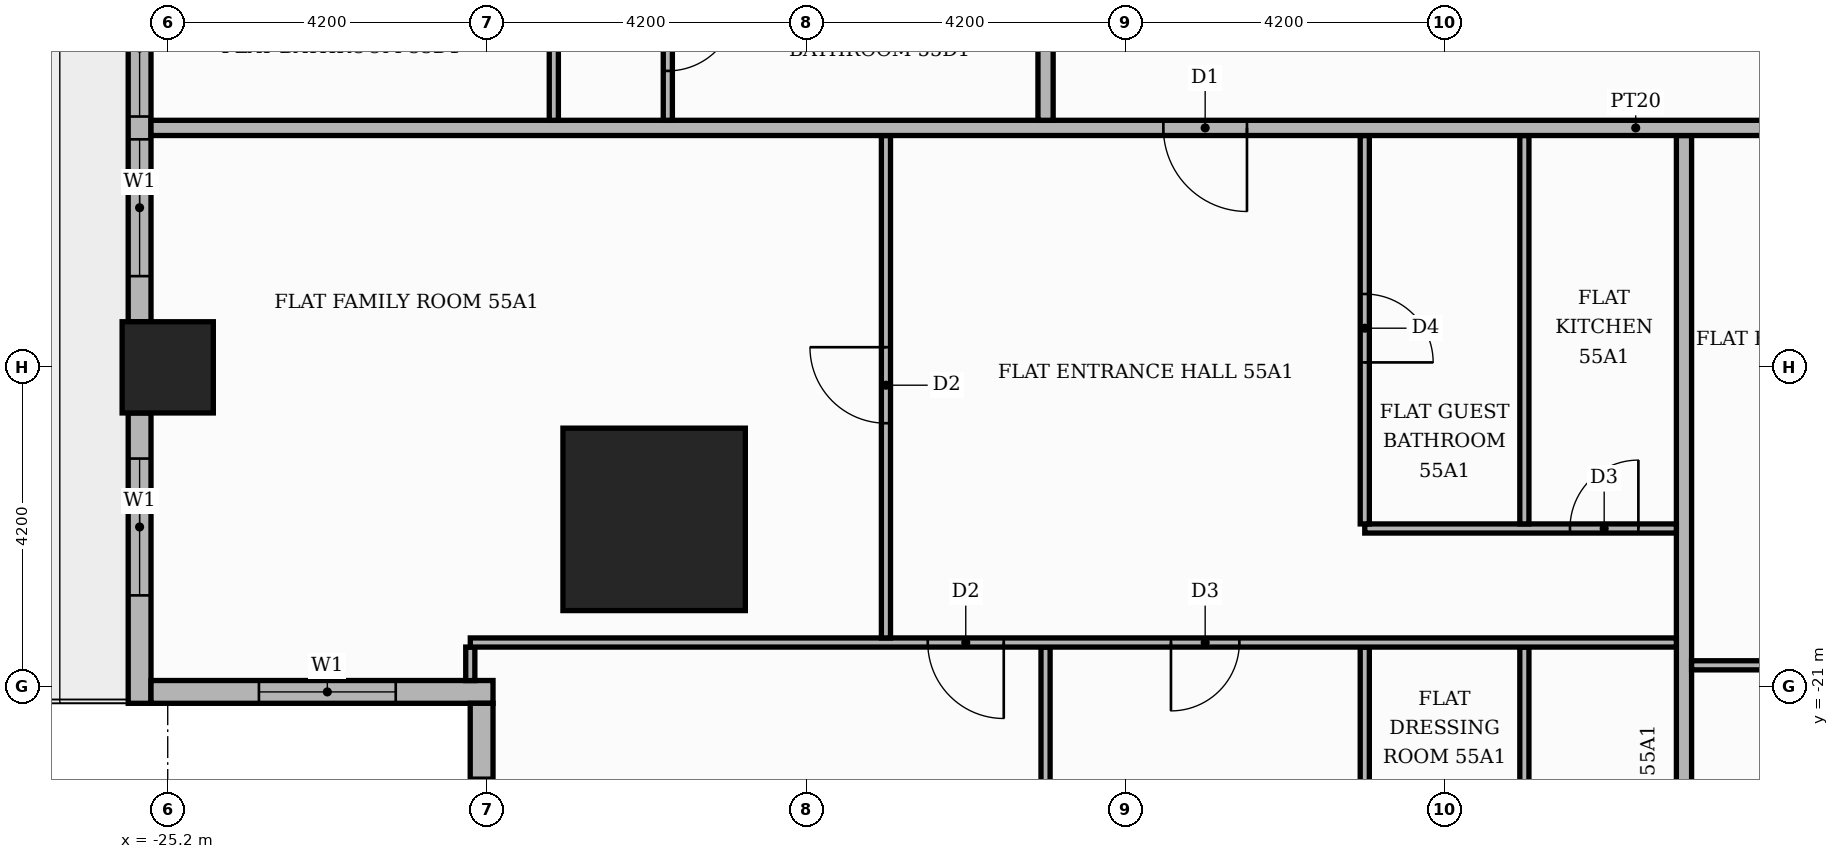
"""IFC4 building model, lengths in metres.
Left out: names, types, materials, properties, quantities, classifications, styles, units other than length and angle.
Written with IfcOpenShell. Run it as: python <this file> out.ifc"""

import sys

from ifc_helpers import new_model, si_unit, direction, frame, frame_2d, origin, origin_2d, place, context, subcontext, project, spatial, rectangle, extrude, element, fill, save


model = new_model("IFC4")
c1 = context("Model", 3, precision=1e-05, world=origin(), true_north=direction((0.0, 1.0)))
c2 = subcontext(c1, "Body", "Model", "MODEL_VIEW")
j1 = project(units=[si_unit("LENGTHUNIT", "METRE"), si_unit("PLANEANGLEUNIT", "RADIAN")], contexts=[c1])
p1 = place(None, origin())
s1 = spatial("IfcSite", under=j1, at=p1, CompositionType="ELEMENT")
p2 = place(p1, origin())
s2 = spatial("IfcBuilding", under=s1, at=p2, CompositionType="ELEMENT")
p3 = place(p2, frame((0.0, 0.0, 231.3)))
s3 = spatial("IfcBuildingStorey", under=s2, at=p3, CompositionType="ELEMENT", Elevation=231.3)
p4 = place(p3, frame((-18.8, -18.8, 0.0), z_axis=(0.0, 0.0, 1.0), x_axis=(1.0, 0.0, 0.0)))
e1 = element("IfcColumn", 1, at=p4, inside=s3, PredefinedType="COLUMN", context=c2, shape_type="SweptSolid", body=[
    extrude(rectangle(XDim=2.4, YDim=2.4, at=origin_2d()), origin(), (0.0, 0.0, 1.0), 3.9),
])
p5 = place(p3, frame((-25.2, -16.8, 0.0), z_axis=(0.0, 0.0, 1.0), x_axis=(1.0, 0.0, 0.0)))
e2 = element("IfcColumn", 2, at=p5, inside=s3, PredefinedType="COLUMN", context=c2, shape_type="SweptSolid", body=[
    extrude(rectangle(XDim=1.2, YDim=1.2, at=origin_2d()), origin(), (0.0, 0.0, 1.0), 3.9),
])
p6 = place(p3, frame((-25.57, -9.0, 0.0), z_axis=(0.0, 0.0, 1.0), x_axis=(0.0, -1.0, 0.0)))
e3 = element("IfcWall", 3, at=p6, inside=s3, PredefinedType="STANDARD", context=c2, shape_type="SweptSolid", body=[
    extrude(rectangle(XDim=7.2, YDim=0.3, at=frame_2d((3.6, 0.0))), origin(), (0.0, 0.0, 1.0), 3.4),
])
p7 = place(p6, frame((0.6, 0.0, 0.9)))
e4 = element("IfcOpeningElement", 4, at=p7, cuts=e3, PredefinedType="OPENING", context=c2, shape_type="SweptSolid", body=[
    extrude(rectangle(XDim=1.8, YDim=2.1, at=frame_2d((0.9, 1.05))), frame((0.0, 0.16, 0.0), z_axis=(0.0, -1.0, 0.0), x_axis=(1.0, 0.0, 0.0)), (0.0, 0.0, 1.0), 0.32),
])
p8 = place(p6, frame((2.7, 0.0, 0.9)))
e5 = element("IfcOpeningElement", 5, at=p8, cuts=e3, PredefinedType="OPENING", context=c2, shape_type="SweptSolid", body=[
    extrude(rectangle(XDim=1.8, YDim=2.1, at=frame_2d((0.9, 1.05))), frame((0.0, 0.16, 0.0), z_axis=(0.0, -1.0, 0.0), x_axis=(1.0, 0.0, 0.0)), (0.0, 0.0, 1.0), 0.32),
])
p9 = place(p6, frame((4.8, 0.0, 0.9)))
e6 = element("IfcOpeningElement", 6, at=p9, cuts=e3, PredefinedType="OPENING", context=c2, shape_type="SweptSolid", body=[
    extrude(rectangle(XDim=1.8, YDim=2.1, at=frame_2d((0.9, 1.05))), frame((0.0, 0.16, 0.0), z_axis=(0.0, -1.0, 0.0), x_axis=(1.0, 0.0, 0.0)), (0.0, 0.0, 1.0), 0.32),
])
p10 = place(p3, frame((-25.57, -17.4, 0.0), z_axis=(0.0, 0.0, 1.0), x_axis=(0.0, -1.0, 0.0)))
e7 = element("IfcWall", 7, at=p10, inside=s3, PredefinedType="STANDARD", context=c2, shape_type="SweptSolid", body=[
    extrude(rectangle(XDim=3.82, YDim=0.3, at=frame_2d((1.91, 0.0))), origin(), (0.0, 0.0, 1.0), 3.4),
])
p11 = place(p10, frame((0.6, 0.0, 0.9)))
e8 = element("IfcOpeningElement", 8, at=p11, cuts=e7, PredefinedType="OPENING", context=c2, shape_type="SweptSolid", body=[
    extrude(rectangle(XDim=1.8, YDim=2.1, at=frame_2d((0.9, 1.05))), frame((0.0, 0.16, 0.0), z_axis=(0.0, -1.0, 0.0), x_axis=(1.0, 0.0, 0.0)), (0.0, 0.0, 1.0), 0.32),
])
p12 = place(p3, frame((-25.42, -21.07, 0.0), z_axis=(0.0, 0.0, 1.0), x_axis=(1.0, 0.0, 0.0)))
e9 = element("IfcWall", 9, at=p12, inside=s3, PredefinedType="STANDARD", context=c2, shape_type="SweptSolid", body=[
    extrude(rectangle(XDim=4.5, YDim=0.3, at=frame_2d((2.25, 0.0))), origin(), (0.0, 0.0, 1.0), 3.4),
])
p13 = place(p12, frame((1.42, 0.0, 0.9)))
e10 = element("IfcOpeningElement", 10, at=p13, cuts=e9, PredefinedType="OPENING", context=c2, shape_type="SweptSolid", body=[
    extrude(rectangle(XDim=1.8, YDim=2.1, at=frame_2d((0.9, 1.05))), frame((0.0, 0.16, 0.0), z_axis=(0.0, -1.0, 0.0), x_axis=(1.0, 0.0, 0.0)), (0.0, 0.0, 1.0), 0.32),
])
p14 = place(p3, frame((-21.07, -21.22, 0.0), z_axis=(0.0, 0.0, 1.0), x_axis=(0.0, -1.0, 0.0)))
e11 = element("IfcWall", 11, at=p14, inside=s3, PredefinedType="STANDARD", context=c2, shape_type="SweptSolid", body=[
    extrude(rectangle(XDim=4.5, YDim=0.3, at=frame_2d((2.25, 0.0))), origin(), (0.0, 0.0, 1.0), 3.4),
])
p15 = place(p14, frame((0.98, 0.0, 0.9)))
e12 = element("IfcOpeningElement", 12, at=p15, cuts=e11, PredefinedType="OPENING", context=c2, shape_type="SweptSolid", body=[
    extrude(rectangle(XDim=1.8, YDim=2.1, at=frame_2d((0.9, 1.05))), frame((0.0, 0.16, 0.0), z_axis=(0.0, -1.0, 0.0), x_axis=(1.0, 0.0, 0.0)), (0.0, 0.0, 1.0), 0.32),
])
p16 = place(p3, frame((-13.65, -25.42, 0.0), z_axis=(0.0, 0.0, 1.0), x_axis=(0.0, 1.0, 0.0)))
e13 = element("IfcWall", 13, at=p16, inside=s3, PredefinedType="PARTITIONING", context=c2, shape_type="SweptSolid", body=[
    extrude(rectangle(XDim=4.94, YDim=0.12, at=frame_2d((2.47, 0.0))), origin(), (0.0, 0.0, 1.0), 3.4),
])
p17 = place(p3, frame((-9.45, -25.42, 0.0), z_axis=(0.0, 0.0, 1.0), x_axis=(0.0, 1.0, 0.0)))
e14 = element("IfcWall", 14, at=p17, inside=s3, PredefinedType="PARTITIONING", context=c2, shape_type="SweptSolid", body=[
    extrude(rectangle(XDim=4.94, YDim=0.12, at=frame_2d((2.47, 0.0))), origin(), (0.0, 0.0, 1.0), 3.4),
])
p18 = place(p17, frame((1.9, 0.0, 0.0)))
e15 = element("IfcOpeningElement", 15, at=p18, cuts=e14, PredefinedType="OPENING", context=c2, shape_type="SweptSolid", body=[
    extrude(rectangle(XDim=0.9, YDim=2.1, at=frame_2d((0.45, 1.05))), frame((0.0, 0.07, 0.0), z_axis=(0.0, -1.0, 0.0), x_axis=(1.0, 0.0, 0.0)), (0.0, 0.0, 1.0), 0.14),
])
p19 = place(p3, frame((-7.35, -25.42, 0.0), z_axis=(0.0, 0.0, 1.0), x_axis=(0.0, 1.0, 0.0)))
e16 = element("IfcWall", 16, at=p19, inside=s3, PredefinedType="PARTITIONING", context=c2, shape_type="SweptSolid", body=[
    extrude(rectangle(XDim=4.94, YDim=0.12, at=frame_2d((2.47, 0.0))), origin(), (0.0, 0.0, 1.0), 3.4),
])
p20 = place(p19, frame((1.9, 0.0, 0.0)))
e17 = element("IfcOpeningElement", 17, at=p20, cuts=e16, PredefinedType="OPENING", context=c2, shape_type="SweptSolid", body=[
    extrude(rectangle(XDim=0.9, YDim=2.1, at=frame_2d((0.45, 1.05))), frame((0.0, 0.07, 0.0), z_axis=(0.0, -1.0, 0.0), x_axis=(1.0, 0.0, 0.0)), (0.0, 0.0, 1.0), 0.14),
])
p21 = place(p3, frame((-5.25, -25.42, 0.0), z_axis=(0.0, 0.0, 1.0), x_axis=(0.0, 1.0, 0.0)))
e18 = element("IfcWall", 18, at=p21, inside=s3, PredefinedType="PARTITIONING", context=c2, shape_type="SweptSolid", body=[
    extrude(rectangle(XDim=11.67, YDim=0.2, at=frame_2d((5.835, 0.0))), origin(), (0.0, 0.0, 1.0), 3.4),
])
p22 = place(p3, frame((-21.219, -20.921, 0.0), z_axis=(0.0, 0.0, 1.0), x_axis=(0.0, 1.0, 0.0)))
e19 = element("IfcWall", 19, at=p22, inside=s3, PredefinedType="PARTITIONING", context=c2, shape_type="SweptSolid", body=[
    extrude(rectangle(XDim=0.441, YDim=0.12, at=frame_2d((0.22, 0.0))), origin(), (0.0, 0.0, 1.0), 3.4),
])
p23 = place(p3, frame((-5.15, -20.72, 0.0), z_axis=(0.0, 0.0, 1.0), x_axis=(1.0, 0.0, 0.0)))
e20 = element("IfcWall", 20, at=p23, inside=s3, PredefinedType="PARTITIONING", context=c2, shape_type="SweptSolid", body=[
    extrude(rectangle(XDim=18.7, YDim=0.12, at=frame_2d((9.35, 0.0))), origin(), (0.0, 0.0, 1.0), 3.4),
])
p24 = place(p23, frame((3.65, 0.0, 0.0)))
e21 = element("IfcOpeningElement", 21, at=p24, cuts=e20, PredefinedType="OPENING", context=c2, shape_type="SweptSolid", body=[
    extrude(rectangle(XDim=0.9, YDim=2.1, at=frame_2d((0.45, 1.05))), frame((0.0, 0.07, 0.0), z_axis=(0.0, -1.0, 0.0), x_axis=(1.0, 0.0, 0.0)), (0.0, 0.0, 1.0), 0.14),
])
p25 = place(p23, frame((15.15, 0.0, 0.0)))
e22 = element("IfcOpeningElement", 22, at=p25, cuts=e20, PredefinedType="OPENING", context=c2, shape_type="SweptSolid", body=[
    extrude(rectangle(XDim=1.0, YDim=2.1, at=frame_2d((0.5, 1.05))), frame((0.0, 0.07, 0.0), z_axis=(0.0, -1.0, 0.0), x_axis=(1.0, 0.0, 0.0)), (0.0, 0.0, 1.0), 0.14),
])
p26 = place(p3, frame((-21.219, -20.42, 0.0), z_axis=(0.0, 0.0, 1.0), x_axis=(1.0, 0.0, 0.0)))
e23 = element("IfcWall", 23, at=p26, inside=s3, PredefinedType="PARTITIONING", context=c2, shape_type="SweptSolid", body=[
    extrude(rectangle(XDim=15.869, YDim=0.12, at=frame_2d((7.935, 0.0))), origin(), (0.0, 0.0, 1.0), 3.4),
])
p27 = place(p26, frame((6.019, 0.0, 0.0)))
e24 = element("IfcOpeningElement", 24, at=p27, cuts=e23, PredefinedType="OPENING", context=c2, shape_type="SweptSolid", body=[
    extrude(rectangle(XDim=1.0, YDim=2.1, at=frame_2d((0.5, 1.05))), frame((0.0, 0.07, 0.0), z_axis=(0.0, -1.0, 0.0), x_axis=(1.0, 0.0, 0.0)), (0.0, 0.0, 1.0), 0.14),
])
p28 = place(p26, frame((9.219, 0.0, 0.0)))
e25 = element("IfcOpeningElement", 25, at=p28, cuts=e23, PredefinedType="OPENING", context=c2, shape_type="SweptSolid", body=[
    extrude(rectangle(XDim=0.9, YDim=2.1, at=frame_2d((0.45, 1.05))), frame((0.0, 0.07, 0.0), z_axis=(0.0, -1.0, 0.0), x_axis=(1.0, 0.0, 0.0)), (0.0, 0.0, 1.0), 0.14),
])
p29 = place(p3, frame((-15.75, -20.36, 0.0), z_axis=(0.0, 0.0, 1.0), x_axis=(0.0, 1.0, 0.0)))
e26 = element("IfcWall", 26, at=p29, inside=s3, PredefinedType="PARTITIONING", context=c2, shape_type="SweptSolid", body=[
    extrude(rectangle(XDim=6.61, YDim=0.12, at=frame_2d((3.305, 0.0))), origin(), (0.0, 0.0, 1.0), 3.4),
])
p30 = place(p29, frame((2.825, 0.0, 0.0)))
e27 = element("IfcOpeningElement", 27, at=p30, cuts=e26, PredefinedType="OPENING", context=c2, shape_type="SweptSolid", body=[
    extrude(rectangle(XDim=1.0, YDim=2.1, at=frame_2d((0.5, 1.05))), frame((0.0, 0.07, 0.0), z_axis=(0.0, -1.0, 0.0), x_axis=(1.0, 0.0, 0.0)), (0.0, 0.0, 1.0), 0.14),
])
p31 = place(p3, frame((-9.45, -18.92, 0.0), z_axis=(0.0, 0.0, 1.0), x_axis=(1.0, 0.0, 0.0)))
e28 = element("IfcWall", 28, at=p31, inside=s3, PredefinedType="PARTITIONING", context=c2, shape_type="SweptSolid", body=[
    extrude(rectangle(XDim=4.1, YDim=0.12, at=frame_2d((2.05, 0.0))), origin(), (0.0, 0.0, 1.0), 3.4),
])
p32 = place(p31, frame((2.7, 0.0, 0.0)))
e29 = element("IfcOpeningElement", 29, at=p32, cuts=e28, PredefinedType="OPENING", context=c2, shape_type="SweptSolid", body=[
    extrude(rectangle(XDim=0.9, YDim=2.1, at=frame_2d((0.45, 1.05))), frame((0.0, 0.07, 0.0), z_axis=(0.0, -1.0, 0.0), x_axis=(1.0, 0.0, 0.0)), (0.0, 0.0, 1.0), 0.14),
])
p33 = place(p3, frame((-9.45, -18.86, 0.0), z_axis=(0.0, 0.0, 1.0), x_axis=(0.0, 1.0, 0.0)))
e30 = element("IfcWall", 30, at=p33, inside=s3, PredefinedType="PARTITIONING", context=c2, shape_type="SweptSolid", body=[
    extrude(rectangle(XDim=5.11, YDim=0.12, at=frame_2d((2.555, 0.0))), origin(), (0.0, 0.0, 1.0), 3.4),
])
p34 = place(p33, frame((2.125, 0.0, 0.0)))
e31 = element("IfcOpeningElement", 31, at=p34, cuts=e30, PredefinedType="OPENING", context=c2, shape_type="SweptSolid", body=[
    extrude(rectangle(XDim=0.9, YDim=2.1, at=frame_2d((0.45, 1.05))), frame((0.0, 0.07, 0.0), z_axis=(0.0, -1.0, 0.0), x_axis=(1.0, 0.0, 0.0)), (0.0, 0.0, 1.0), 0.14),
])
p35 = place(p3, frame((-7.35, -18.86, 0.0), z_axis=(0.0, 0.0, 1.0), x_axis=(0.0, 1.0, 0.0)))
e32 = element("IfcWall", 32, at=p35, inside=s3, PredefinedType="PARTITIONING", context=c2, shape_type="SweptSolid", body=[
    extrude(rectangle(XDim=5.11, YDim=0.12, at=frame_2d((2.555, 0.0))), origin(), (0.0, 0.0, 1.0), 3.4),
])
p36 = place(p3, frame((-25.42, -13.65, 0.0), z_axis=(0.0, 0.0, 1.0), x_axis=(1.0, 0.0, 0.0)))
e33 = element("IfcWall", 33, at=p36, inside=s3, PredefinedType="PARTITIONING", context=c2, shape_type="SweptSolid", body=[
    extrude(rectangle(XDim=39.07, YDim=0.2, at=frame_2d((19.535, 0.0))), origin(), (0.0, 0.0, 1.0), 3.4),
])
p37 = place(p36, frame((13.32, 0.0, 0.0)))
e34 = element("IfcOpeningElement", 34, at=p37, cuts=e33, PredefinedType="OPENING", context=c2, shape_type="SweptSolid", body=[
    extrude(rectangle(XDim=1.1, YDim=2.4, at=frame_2d((0.55, 1.2))), frame((0.0, 0.11, 0.0), z_axis=(0.0, -1.0, 0.0), x_axis=(1.0, 0.0, 0.0)), (0.0, 0.0, 1.0), 0.22),
])
p38 = place(p36, frame((21.72, 0.0, 0.0)))
e35 = element("IfcOpeningElement", 35, at=p38, cuts=e33, PredefinedType="OPENING", context=c2, shape_type="SweptSolid", body=[
    extrude(rectangle(XDim=1.1, YDim=2.4, at=frame_2d((0.55, 1.2))), frame((0.0, 0.11, 0.0), z_axis=(0.0, -1.0, 0.0), x_axis=(1.0, 0.0, 0.0)), (0.0, 0.0, 1.0), 0.22),
])
p39 = place(p3, frame((-20.12, -13.55, 0.0), z_axis=(0.0, 0.0, 1.0), x_axis=(0.0, 1.0, 0.0)))
e36 = element("IfcWall", 36, at=p39, inside=s3, PredefinedType="PARTITIONING", context=c2, shape_type="SweptSolid", body=[
    extrude(rectangle(XDim=1.94, YDim=0.12, at=frame_2d((0.97, 0.0))), origin(), (0.0, 0.0, 1.0), 3.4),
])
p40 = place(p3, frame((-18.62, -13.55, 0.0), z_axis=(0.0, 0.0, 1.0), x_axis=(0.0, 1.0, 0.0)))
e37 = element("IfcWall", 37, at=p40, inside=s3, PredefinedType="PARTITIONING", context=c2, shape_type="SweptSolid", body=[
    extrude(rectangle(XDim=2.24, YDim=0.12, at=frame_2d((1.12, 0.0))), origin(), (0.0, 0.0, 1.0), 3.4),
])
p41 = place(p40, frame((0.65, 0.0, 0.0)))
e38 = element("IfcOpeningElement", 38, at=p41, cuts=e37, PredefinedType="OPENING", context=c2, shape_type="SweptSolid", body=[
    extrude(rectangle(XDim=0.9, YDim=2.1, at=frame_2d((0.45, 1.05))), frame((0.0, 0.07, 0.0), z_axis=(0.0, -1.0, 0.0), x_axis=(1.0, 0.0, 0.0)), (0.0, 0.0, 1.0), 0.14),
])
p42 = place(p3, frame((-13.65, -13.55, 0.0), z_axis=(0.0, 0.0, 1.0), x_axis=(0.0, 1.0, 0.0)))
e39 = element("IfcWall", 39, at=p42, inside=s3, PredefinedType="PARTITIONING", context=c2, shape_type="SweptSolid", body=[
    extrude(rectangle(XDim=27.1, YDim=0.2, at=frame_2d((13.55, 0.0))), origin(), (0.0, 0.0, 1.0), 3.4),
])
p43 = place(p42, frame((23.5, 0.0, 0.0)))
e40 = element("IfcOpeningElement", 40, at=p43, cuts=e39, PredefinedType="OPENING", context=c2, shape_type="SweptSolid", body=[
    extrude(rectangle(XDim=1.1, YDim=2.4, at=frame_2d((0.55, 1.2))), frame((0.0, 0.11, 0.0), z_axis=(0.0, -1.0, 0.0), x_axis=(1.0, 0.0, 0.0)), (0.0, 0.0, 1.0), 0.22),
])
p44 = place(p8, origin())
e41 = element("IfcWindow", 41, at=p44, inside=s3, PartitioningType="SINGLE_PANEL", PredefinedType="WINDOW", context=c2, shape_type="SweptSolid", body=[
    extrude(rectangle(XDim=1.8, YDim=2.1, at=frame_2d((0.9, 1.05))), frame((0.0, 0.03, 0.0), z_axis=(0.0, -1.0, 0.0), x_axis=(1.0, 0.0, 0.0)), (0.0, 0.0, 1.0), 0.06),
])
fill(e5, e41)
p45 = place(p9, origin())
e42 = element("IfcWindow", 42, at=p45, inside=s3, PartitioningType="SINGLE_PANEL", PredefinedType="WINDOW", context=c2, shape_type="SweptSolid", body=[
    extrude(rectangle(XDim=1.8, YDim=2.1, at=frame_2d((0.9, 1.05))), frame((0.0, 0.03, 0.0), z_axis=(0.0, -1.0, 0.0), x_axis=(1.0, 0.0, 0.0)), (0.0, 0.0, 1.0), 0.06),
])
fill(e6, e42)
p46 = place(p11, origin())
e43 = element("IfcWindow", 43, at=p46, inside=s3, PartitioningType="SINGLE_PANEL", PredefinedType="WINDOW", context=c2, shape_type="SweptSolid", body=[
    extrude(rectangle(XDim=1.8, YDim=2.1, at=frame_2d((0.9, 1.05))), frame((0.0, 0.03, 0.0), z_axis=(0.0, -1.0, 0.0), x_axis=(1.0, 0.0, 0.0)), (0.0, 0.0, 1.0), 0.06),
])
fill(e8, e43)
p47 = place(p13, origin())
e44 = element("IfcWindow", 44, at=p47, inside=s3, PartitioningType="SINGLE_PANEL", PredefinedType="WINDOW", context=c2, shape_type="SweptSolid", body=[
    extrude(rectangle(XDim=1.8, YDim=2.1, at=frame_2d((0.9, 1.05))), frame((0.0, 0.03, 0.0), z_axis=(0.0, -1.0, 0.0), x_axis=(1.0, 0.0, 0.0)), (0.0, 0.0, 1.0), 0.06),
])
fill(e10, e44)
p48 = place(p15, origin())
e45 = element("IfcWindow", 45, at=p48, inside=s3, PartitioningType="SINGLE_PANEL", PredefinedType="WINDOW", context=c2, shape_type="SweptSolid", body=[
    extrude(rectangle(XDim=1.8, YDim=2.1, at=frame_2d((0.9, 1.05))), frame((0.0, 0.03, 0.0), z_axis=(0.0, -1.0, 0.0), x_axis=(1.0, 0.0, 0.0)), (0.0, 0.0, 1.0), 0.06),
])
fill(e12, e45)
p49 = place(p37, frame((1.1, 0.0, 0.0), z_axis=(0.0, 0.0, 1.0), x_axis=(-1.0, 0.0, 0.0)))
e46 = element("IfcDoor", 46, at=p49, inside=s3, OperationType="SINGLE_SWING_RIGHT", PredefinedType="DOOR", context=c2, shape_type="SweptSolid", body=[
    extrude(rectangle(XDim=1.1, YDim=2.4, at=frame_2d((0.55, 1.2))), frame((0.0, 0.025, 0.0), z_axis=(0.0, -1.0, 0.0), x_axis=(1.0, 0.0, 0.0)), (0.0, 0.0, 1.0), 0.05),
])
fill(e34, e46)
p50 = place(p30, origin())
e47 = element("IfcDoor", 47, at=p50, inside=s3, OperationType="SINGLE_SWING_RIGHT", PredefinedType="DOOR", context=c2, shape_type="SweptSolid", body=[
    extrude(rectangle(XDim=1.0, YDim=2.1, at=frame_2d((0.5, 1.05))), frame((0.0, 0.025, 0.0), z_axis=(0.0, -1.0, 0.0), x_axis=(1.0, 0.0, 0.0)), (0.0, 0.0, 1.0), 0.05),
])
fill(e27, e47)
p51 = place(p34, frame((0.9, 0.0, 0.0), z_axis=(0.0, 0.0, 1.0), x_axis=(-1.0, 0.0, 0.0)))
e48 = element("IfcDoor", 48, at=p51, inside=s3, OperationType="SINGLE_SWING_LEFT", PredefinedType="DOOR", context=c2, shape_type="SweptSolid", body=[
    extrude(rectangle(XDim=0.9, YDim=2.1, at=frame_2d((0.45, 1.05))), frame((0.0, 0.025, 0.0), z_axis=(0.0, -1.0, 0.0), x_axis=(1.0, 0.0, 0.0)), (0.0, 0.0, 1.0), 0.05),
])
fill(e31, e48)
p52 = place(p32, origin())
e49 = element("IfcDoor", 49, at=p52, inside=s3, OperationType="SINGLE_SWING_RIGHT", PredefinedType="DOOR", context=c2, shape_type="SweptSolid", body=[
    extrude(rectangle(XDim=0.9, YDim=2.1, at=frame_2d((0.45, 1.05))), frame((0.0, 0.025, 0.0), z_axis=(0.0, -1.0, 0.0), x_axis=(1.0, 0.0, 0.0)), (0.0, 0.0, 1.0), 0.05),
])
fill(e29, e49)
p53 = place(p27, frame((1.0, 0.0, 0.0), z_axis=(0.0, 0.0, 1.0), x_axis=(-1.0, 0.0, 0.0)))
e50 = element("IfcDoor", 50, at=p53, inside=s3, OperationType="SINGLE_SWING_RIGHT", PredefinedType="DOOR", context=c2, shape_type="SweptSolid", body=[
    extrude(rectangle(XDim=1.0, YDim=2.1, at=frame_2d((0.5, 1.05))), frame((0.0, 0.025, 0.0), z_axis=(0.0, -1.0, 0.0), x_axis=(1.0, 0.0, 0.0)), (0.0, 0.0, 1.0), 0.05),
])
fill(e24, e50)
p54 = place(p28, frame((0.9, 0.0, 0.0), z_axis=(0.0, 0.0, 1.0), x_axis=(-1.0, 0.0, 0.0)))
e51 = element("IfcDoor", 51, at=p54, inside=s3, OperationType="SINGLE_SWING_LEFT", PredefinedType="DOOR", context=c2, shape_type="SweptSolid", body=[
    extrude(rectangle(XDim=0.9, YDim=2.1, at=frame_2d((0.45, 1.05))), frame((0.0, 0.025, 0.0), z_axis=(0.0, -1.0, 0.0), x_axis=(1.0, 0.0, 0.0)), (0.0, 0.0, 1.0), 0.05),
])
fill(e25, e51)
p55 = place(p41, frame((0.9, 0.0, 0.0), z_axis=(0.0, 0.0, 1.0), x_axis=(-1.0, 0.0, 0.0)))
e52 = element("IfcDoor", 52, at=p55, inside=s3, OperationType="SINGLE_SWING_RIGHT", PredefinedType="DOOR", context=c2, shape_type="SweptSolid", body=[
    extrude(rectangle(XDim=0.9, YDim=2.1, at=frame_2d((0.45, 1.05))), frame((0.0, 0.025, 0.0), z_axis=(0.0, -1.0, 0.0), x_axis=(1.0, 0.0, 0.0)), (0.0, 0.0, 1.0), 0.05),
])
fill(e38, e52)
save(model, sys.argv[1])
